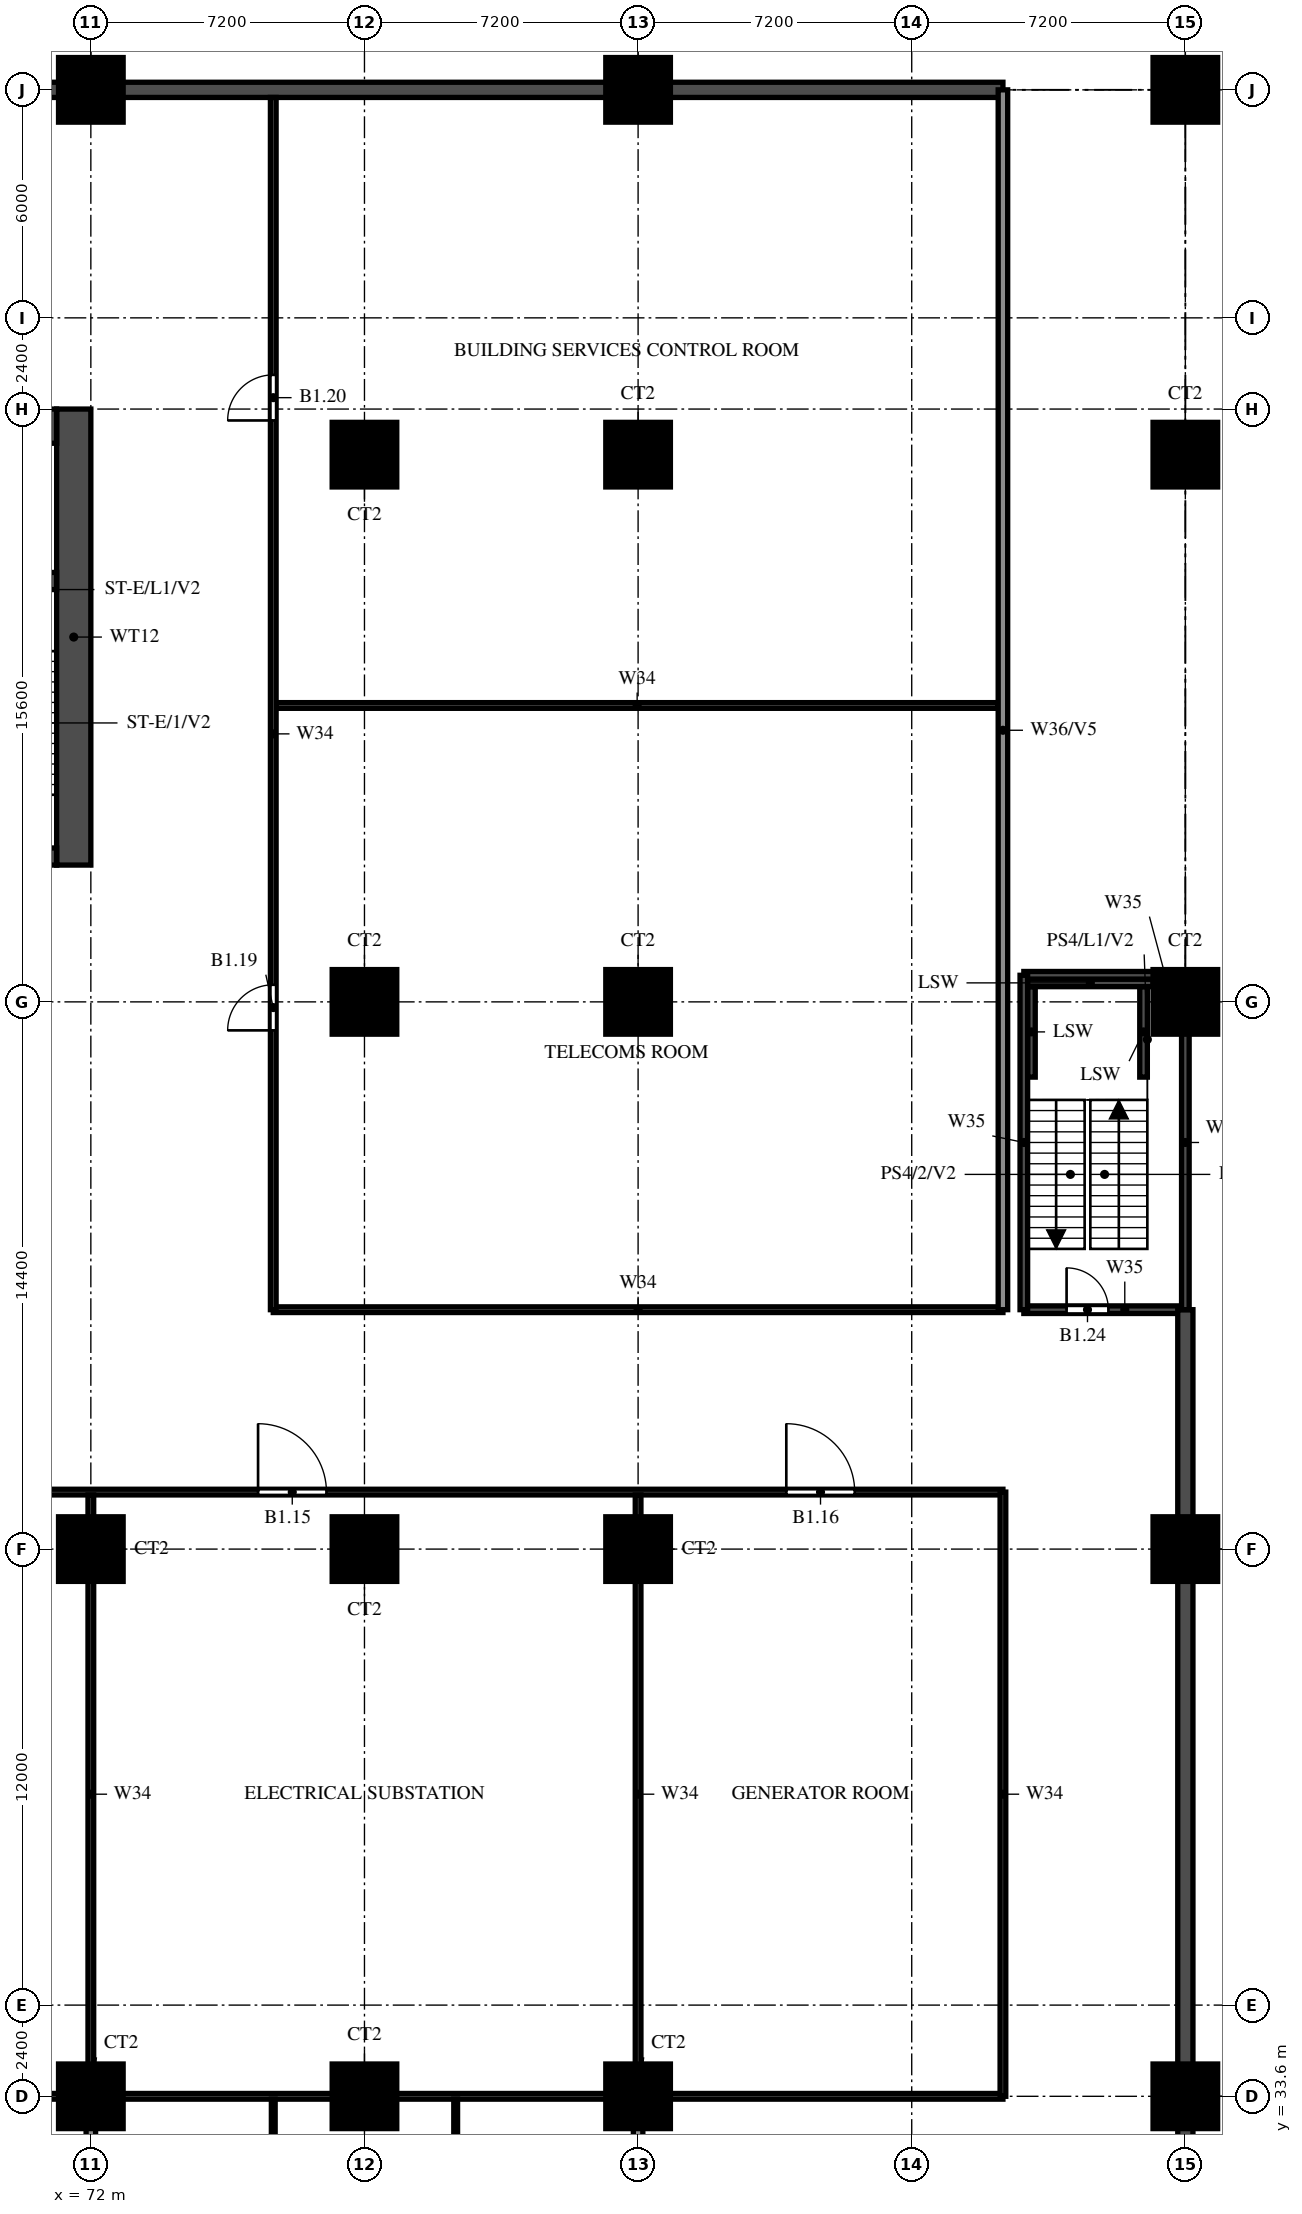
"""IFC4 building model, lengths in metres.
Left out: names, types, materials, properties, quantities, classifications, styles, units other than length and angle.
Written with IfcOpenShell. Run it as: python <this file> out.ifc"""

import sys

from ifc_helpers import new_model, si_unit, direction, frame, frame_2d, origin, origin_2d, place, context, subcontext, project, spatial, rectangle, extrude, source, transform, mapped, element, fill, save


model = new_model("IFC4")
c1 = context("Model", 3, precision=1e-05, world=origin(), true_north=direction((0.0, 1.0)))
c2 = subcontext(c1, "Body", "Model", "MODEL_VIEW")
j1 = project(units=[si_unit("LENGTHUNIT", "METRE"), si_unit("PLANEANGLEUNIT", "RADIAN")], contexts=[c1])
p1 = place(None, origin())
s1 = spatial("IfcSite", under=j1, at=p1, CompositionType="ELEMENT")
p2 = place(p1, origin())
s2 = spatial("IfcBuilding", under=s1, at=p2, CompositionType="ELEMENT")
p3 = place(p2, frame((0.0, 0.0, -5.4)))
s3 = spatial("IfcBuildingStorey", under=s2, at=p3, CompositionType="ELEMENT", Elevation=-5.4)
m1 = source(origin(), c2, "Body", "SweptSolid", [
    extrude(rectangle(XDim=1.7, YDim=1.7, at=origin_2d()), origin(), (0.0, 0.0, 1.0), 5.0),
])
for number, where, z_axis, x_axis in (
    (1, (72.0, 33.6, 0.0), (0.0, 0.0, 1.0), (1.0, 0.0, 0.0)),
    (2, (79.2, 33.6, 0.0), (0.0, 0.0, 1.0), (1.0, 0.0, 0.0)),
    (3, (86.4, 33.6, 0.0), (0.0, 0.0, 1.0), (1.0, 0.0, 0.0)),
    (4, (100.8, 33.6, 0.0), (0.0, 0.0, 1.0), (1.0, 0.0, 0.0)),
    (5, (72.0, 48.0, 0.0), (0.0, 0.0, 1.0), (1.0, 0.0, 0.0)),
    (6, (79.2, 48.0, 0.0), (0.0, 0.0, 1.0), (1.0, 0.0, 0.0)),
    (7, (86.4, 48.0, 0.0), (0.0, 0.0, 1.0), (1.0, 0.0, 0.0)),
    (8, (100.8, 48.0, 0.0), (0.0, 0.0, 1.0), (1.0, 0.0, 0.0)),
    (9, (79.2, 62.4, 0.0), (0.0, 0.0, 1.0), (1.0, 0.0, 0.0)),
    (10, (86.4, 62.4, 0.0), (0.0, 0.0, 1.0), (1.0, 0.0, 0.0)),
    (11, (100.8, 62.4, 0.0), (0.0, 0.0, 1.0), (1.0, 0.0, 0.0)),
    (12, (79.2, 76.8, 0.0), (0.0, 0.0, 1.0), (1.0, 0.0, 0.0)),
    (13, (86.4, 76.8, 0.0), (0.0, 0.0, 1.0), (1.0, 0.0, 0.0)),
    (14, (100.8, 76.8, 0.0), (0.0, 0.0, 1.0), (1.0, 0.0, 0.0)),
    (15, (72.0, 86.4, 0.0), (0.0, 0.0, 1.0), (1.0, 0.0, 0.0)),
    (16, (86.4, 86.4, 0.0), (0.0, 0.0, 1.0), (1.0, 0.0, 0.0)),
    (17, (100.8, 86.4, 0.0), (0.0, 0.0, 1.0), (1.0, 0.0, 0.0)),
):
    element("IfcColumn", number, at=place(p3, frame(where, z_axis=z_axis, x_axis=x_axis)), inside=s3, PredefinedType="COLUMN", context=c2, shape_type="MappedRepresentation", body=[
        mapped(m1, transform((0.0, 0.0, 0.0))),
    ])
p4 = place(p3, frame((71.55, 66.0, 0.0), z_axis=(0.0, 0.0, 1.0), x_axis=(0.0, 1.0, 0.0)))
e18 = element("IfcWall", 18, at=p4, inside=s3, PredefinedType="SHEAR", context=c2, shape_type="SweptSolid", body=[
    extrude(rectangle(XDim=12.0, YDim=0.9, at=frame_2d((6.0, 0.0))), origin(), (0.0, 0.0, 1.0), 5.0),
])
p5 = place(p3, frame((29.7, 77.55, 0.0), z_axis=(0.0, 0.0, 1.0), x_axis=(1.0, 0.0, 0.0)))
e19 = element("IfcWall", 19, at=p5, inside=s3, PredefinedType="SHEAR", context=c2, shape_type="SweptSolid", body=[
    extrude(rectangle(XDim=41.4, YDim=0.9, at=frame_2d((20.7, 0.0))), origin(), (0.0, 0.0, 1.0), 5.0),
])
p6 = place(p3, frame((29.7, 66.225, 0.0), z_axis=(0.0, 0.0, 1.0), x_axis=(1.0, 0.0, 0.0)))
e20 = element("IfcWall", 20, at=p6, inside=s3, PredefinedType="SHEAR", context=c2, shape_type="SweptSolid", body=[
    extrude(rectangle(XDim=41.4, YDim=0.45, at=frame_2d((20.7, 0.0))), origin(), (0.0, 0.0, 1.0), 5.0),
])
p7 = place(p6, frame((0.925, 0.0, 0.0)))
e21 = element("IfcOpeningElement", 21, at=p7, cuts=e20, PredefinedType="OPENING", context=c2, shape_type="SweptSolid", body=[
    extrude(rectangle(XDim=1.1, YDim=2.1, at=frame_2d((0.55, 1.05))), frame((0.0, 0.235, 0.0), z_axis=(0.0, -1.0, 0.0), x_axis=(1.0, 0.0, 0.0)), (0.0, 0.0, 1.0), 0.47),
])
p8 = place(p6, frame((3.738, 0.0, 0.0)))
e22 = element("IfcOpeningElement", 22, at=p8, cuts=e20, PredefinedType="OPENING", context=c2, shape_type="SweptSolid", body=[
    extrude(rectangle(XDim=1.8, YDim=2.1, at=frame_2d((0.9, 1.05))), frame((0.0, 0.235, 0.0), z_axis=(0.0, -1.0, 0.0), x_axis=(1.0, 0.0, 0.0)), (0.0, 0.0, 1.0), 0.47),
])
p9 = place(p3, frame((67.925, 73.475, 0.0), z_axis=(0.0, 0.0, 1.0), x_axis=(1.0, 0.0, 0.0)))
e23 = element("IfcWall", 23, at=p9, inside=s3, PredefinedType="SHEAR", context=c2, shape_type="SweptSolid", body=[
    extrude(rectangle(XDim=3.175, YDim=0.45, at=frame_2d((1.587, 0.0))), origin(), (0.0, 0.0, 1.0), 5.0),
])
for number, where, z_axis, x_axis in (
    (24, (96.75, 60.42, 0.0), (0.0, 0.0, 1.0), (0.0, 1.0, 0.0)),
    (25, (99.7, 60.42, 0.0), (0.0, 0.0, 1.0), (0.0, 1.0, 0.0)),
):
    element("IfcWall", number, at=place(p3, frame(where, z_axis=z_axis, x_axis=x_axis)), inside=s3, PredefinedType="SOLIDWALL", context=c2, shape_type="SweptSolid", body=[
        extrude(rectangle(XDim=2.38, YDim=0.2, at=frame_2d((1.19, 0.0))), origin(), (0.0, 0.0, 1.0), 2.5),
    ])
p10 = place(p3, frame((96.65, 62.9, 0.0), z_axis=(0.0, 0.0, 1.0), x_axis=(1.0, 0.0, 0.0)))
e26 = element("IfcWall", 26, at=p10, inside=s3, PredefinedType="SOLIDWALL", context=c2, shape_type="SweptSolid", body=[
    extrude(rectangle(XDim=3.3, YDim=0.2, at=frame_2d((1.65, 0.0))), origin(), (0.0, 0.0, 1.0), 2.5),
])
p11 = place(p3, frame((4.8, 33.6, 0.0), z_axis=(0.0, 0.0, 1.0), x_axis=(1.0, 0.0, 0.0)))
e27 = element("IfcWall", 27, at=p11, inside=s3, PredefinedType="PARTITIONING", context=c2, shape_type="SweptSolid", body=[
    extrude(rectangle(XDim=91.2, YDim=0.15, at=frame_2d((45.6, 0.0))), origin(), (0.0, 0.0, 1.0), 3.8),
])
p12 = place(p3, frame((4.8, 49.5, 0.0), z_axis=(0.0, 0.0, 1.0), x_axis=(1.0, 0.0, 0.0)))
e28 = element("IfcWall", 28, at=p12, inside=s3, PredefinedType="PARTITIONING", context=c2, shape_type="SweptSolid", body=[
    extrude(rectangle(XDim=91.2, YDim=0.15, at=frame_2d((45.6, 0.0))), origin(), (0.0, 0.0, 1.0), 3.8),
])
p13 = place(p12, frame((6.8, 0.0, 0.0)))
e29 = element("IfcOpeningElement", 29, at=p13, cuts=e28, PredefinedType="OPENING", context=c2, shape_type="SweptSolid", body=[
    extrude(rectangle(XDim=1.8, YDim=2.4, at=frame_2d((0.9, 1.2))), frame((0.0, 0.085, 0.0), z_axis=(0.0, -1.0, 0.0), x_axis=(1.0, 0.0, 0.0)), (0.0, 0.0, 1.0), 0.17),
])
p14 = place(p12, frame((27.9, 0.0, 0.0)))
e30 = element("IfcOpeningElement", 30, at=p14, cuts=e28, PredefinedType="OPENING", context=c2, shape_type="SweptSolid", body=[
    extrude(rectangle(XDim=1.8, YDim=2.4, at=frame_2d((0.9, 1.2))), frame((0.0, 0.085, 0.0), z_axis=(0.0, -1.0, 0.0), x_axis=(1.0, 0.0, 0.0)), (0.0, 0.0, 1.0), 0.17),
])
p15 = place(p12, frame((42.8, 0.0, 0.0)))
e31 = element("IfcOpeningElement", 31, at=p15, cuts=e28, PredefinedType="OPENING", context=c2, shape_type="SweptSolid", body=[
    extrude(rectangle(XDim=1.8, YDim=2.4, at=frame_2d((0.9, 1.2))), frame((0.0, 0.085, 0.0), z_axis=(0.0, -1.0, 0.0), x_axis=(1.0, 0.0, 0.0)), (0.0, 0.0, 1.0), 0.17),
])
p16 = place(p12, frame((57.2, 0.0, 0.0)))
e32 = element("IfcOpeningElement", 32, at=p16, cuts=e28, PredefinedType="OPENING", context=c2, shape_type="SweptSolid", body=[
    extrude(rectangle(XDim=1.8, YDim=2.4, at=frame_2d((0.9, 1.2))), frame((0.0, 0.085, 0.0), z_axis=(0.0, -1.0, 0.0), x_axis=(1.0, 0.0, 0.0)), (0.0, 0.0, 1.0), 0.17),
])
p17 = place(p12, frame((71.6, 0.0, 0.0)))
e33 = element("IfcOpeningElement", 33, at=p17, cuts=e28, PredefinedType="OPENING", context=c2, shape_type="SweptSolid", body=[
    extrude(rectangle(XDim=1.8, YDim=2.4, at=frame_2d((0.9, 1.2))), frame((0.0, 0.085, 0.0), z_axis=(0.0, -1.0, 0.0), x_axis=(1.0, 0.0, 0.0)), (0.0, 0.0, 1.0), 0.17),
])
p18 = place(p12, frame((85.5, 0.0, 0.0)))
e34 = element("IfcOpeningElement", 34, at=p18, cuts=e28, PredefinedType="OPENING", context=c2, shape_type="SweptSolid", body=[
    extrude(rectangle(XDim=1.8, YDim=2.4, at=frame_2d((0.9, 1.2))), frame((0.0, 0.085, 0.0), z_axis=(0.0, -1.0, 0.0), x_axis=(1.0, 0.0, 0.0)), (0.0, 0.0, 1.0), 0.17),
])
p19 = place(p3, frame((76.8, 54.3, 0.0), z_axis=(0.0, 0.0, 1.0), x_axis=(1.0, 0.0, 0.0)))
e35 = element("IfcWall", 35, at=p19, inside=s3, PredefinedType="PARTITIONING", context=c2, shape_type="SweptSolid", body=[
    extrude(rectangle(XDim=19.2, YDim=0.15, at=frame_2d((9.6, 0.0))), origin(), (0.0, 0.0, 1.0), 3.8),
])
p20 = place(p3, frame((96.55, 54.3, 0.0), z_axis=(0.0, 0.0, 1.0), x_axis=(1.0, 0.0, 0.0)))
e36 = element("IfcWall", 36, at=p20, inside=s3, PredefinedType="SOLIDWALL", context=c2, shape_type="SweptSolid", body=[
    extrude(rectangle(XDim=4.25, YDim=0.2, at=frame_2d((2.125, 0.0))), origin(), (0.0, 0.0, 1.0), 5.0),
])
p21 = place(p20, frame((1.125, 0.0, 0.0)))
e37 = element("IfcOpeningElement", 37, at=p21, cuts=e36, PredefinedType="OPENING", context=c2, shape_type="SweptSolid", body=[
    extrude(rectangle(XDim=1.1, YDim=2.1, at=frame_2d((0.55, 1.05))), frame((0.0, 0.11, 0.0), z_axis=(0.0, -1.0, 0.0), x_axis=(1.0, 0.0, 0.0)), (0.0, 0.0, 1.0), 0.22),
])
p22 = place(p3, frame((96.55, 63.1, 0.0), z_axis=(0.0, 0.0, 1.0), x_axis=(1.0, 0.0, 0.0)))
e38 = element("IfcWall", 38, at=p22, inside=s3, PredefinedType="SOLIDWALL", context=c2, shape_type="SweptSolid", body=[
    extrude(rectangle(XDim=4.25, YDim=0.2, at=frame_2d((2.125, 0.0))), origin(), (0.0, 0.0, 1.0), 5.0),
])
p23 = place(p3, frame((76.875, 70.2, 0.0), z_axis=(0.0, 0.0, 1.0), x_axis=(1.0, 0.0, 0.0)))
e39 = element("IfcWall", 39, at=p23, inside=s3, PredefinedType="PARTITIONING", context=c2, shape_type="SweptSolid", body=[
    extrude(rectangle(XDim=19.0, YDim=0.15, at=frame_2d((9.5, 0.0))), origin(), (0.0, 0.0, 1.0), 3.8),
])
p24 = place(p3, frame((4.8, 86.4, 0.0), z_axis=(0.0, 0.0, 1.0), x_axis=(1.0, 0.0, 0.0)))
e40 = element("IfcWall", 40, at=p24, inside=s3, PredefinedType="SOLIDWALL", context=c2, shape_type="SweptSolid", body=[
    extrude(rectangle(XDim=91.2, YDim=0.4, at=frame_2d((45.6, 0.0))), origin(), (0.0, 0.0, 1.0), 5.0),
])
p25 = place(p3, frame((72.0, 33.675, 0.0), z_axis=(0.0, 0.0, 1.0), x_axis=(0.0, 1.0, 0.0)))
e41 = element("IfcWall", 41, at=p25, inside=s3, PredefinedType="PARTITIONING", context=c2, shape_type="SweptSolid", body=[
    extrude(rectangle(XDim=15.75, YDim=0.15, at=frame_2d((7.875, 0.0))), origin(), (0.0, 0.0, 1.0), 3.8),
])
p26 = place(p3, frame((72.0, 24.0, 0.0), z_axis=(0.0, 0.0, 1.0), x_axis=(0.0, 1.0, 0.0)))
e42 = element("IfcWall", 42, at=p26, inside=s3, PredefinedType="SOLIDWALL", context=c2, shape_type="SweptSolid", body=[
    extrude(rectangle(XDim=9.525, YDim=0.25, at=frame_2d((4.762, 0.0))), origin(), (0.0, 0.0, 1.0), 3.8),
])
p27 = place(p3, frame((76.8, 24.125, 0.0), z_axis=(0.0, 0.0, 1.0), x_axis=(0.0, 1.0, 0.0)))
e43 = element("IfcWall", 43, at=p27, inside=s3, PredefinedType="PARTITIONING", context=c2, shape_type="SweptSolid", body=[
    extrude(rectangle(XDim=9.4, YDim=0.1, at=frame_2d((4.7, 0.0))), origin(), (0.0, 0.0, 1.0), 5.0),
])
p28 = place(p27, frame((2.675, 0.0, 0.0)))
e44 = element("IfcOpeningElement", 44, at=p28, cuts=e43, PredefinedType="OPENING", context=c2, shape_type="SweptSolid", body=[
    extrude(rectangle(XDim=1.0, YDim=2.1, at=frame_2d((0.5, 1.05))), frame((0.0, 0.06, 0.0), z_axis=(0.0, -1.0, 0.0), x_axis=(1.0, 0.0, 0.0)), (0.0, 0.0, 1.0), 0.12),
])
p29 = place(p27, frame((7.475, 0.0, 0.0)))
e45 = element("IfcOpeningElement", 45, at=p29, cuts=e43, PredefinedType="OPENING", context=c2, shape_type="SweptSolid", body=[
    extrude(rectangle(XDim=1.0, YDim=2.1, at=frame_2d((0.5, 1.05))), frame((0.0, 0.06, 0.0), z_axis=(0.0, -1.0, 0.0), x_axis=(1.0, 0.0, 0.0)), (0.0, 0.0, 1.0), 0.12),
])
p30 = place(p3, frame((76.8, 54.3, 0.0), z_axis=(0.0, 0.0, 1.0), x_axis=(0.0, 1.0, 0.0)))
e46 = element("IfcWall", 46, at=p30, inside=s3, PredefinedType="PARTITIONING", context=c2, shape_type="SweptSolid", body=[
    extrude(rectangle(XDim=31.9, YDim=0.15, at=frame_2d((15.95, 0.0))), origin(), (0.0, 0.0, 1.0), 3.8),
])
p31 = place(p30, frame((7.35, 0.0, 0.0)))
e47 = element("IfcOpeningElement", 47, at=p31, cuts=e46, PredefinedType="OPENING", context=c2, shape_type="SweptSolid", body=[
    extrude(rectangle(XDim=1.2, YDim=2.1, at=frame_2d((0.6, 1.05))), frame((0.0, 0.085, 0.0), z_axis=(0.0, -1.0, 0.0), x_axis=(1.0, 0.0, 0.0)), (0.0, 0.0, 1.0), 0.17),
])
p32 = place(p30, frame((23.4, 0.0, 0.0)))
e48 = element("IfcOpeningElement", 48, at=p32, cuts=e46, PredefinedType="OPENING", context=c2, shape_type="SweptSolid", body=[
    extrude(rectangle(XDim=1.2, YDim=2.1, at=frame_2d((0.6, 1.05))), frame((0.0, 0.085, 0.0), z_axis=(0.0, -1.0, 0.0), x_axis=(1.0, 0.0, 0.0)), (0.0, 0.0, 1.0), 0.17),
])
p33 = place(p3, frame((81.6, 24.125, 0.0), z_axis=(0.0, 0.0, 1.0), x_axis=(0.0, 1.0, 0.0)))
e49 = element("IfcWall", 49, at=p33, inside=s3, PredefinedType="PARTITIONING", context=c2, shape_type="SweptSolid", body=[
    extrude(rectangle(XDim=9.4, YDim=0.1, at=frame_2d((4.7, 0.0))), origin(), (0.0, 0.0, 1.0), 5.0),
])
p34 = place(p33, frame((4.175, 0.0, 0.0)))
e50 = element("IfcOpeningElement", 50, at=p34, cuts=e49, PredefinedType="OPENING", context=c2, shape_type="SweptSolid", body=[
    extrude(rectangle(XDim=1.0, YDim=2.1, at=frame_2d((0.5, 1.05))), frame((0.0, 0.06, 0.0), z_axis=(0.0, -1.0, 0.0), x_axis=(1.0, 0.0, 0.0)), (0.0, 0.0, 1.0), 0.12),
])
p35 = place(p3, frame((86.4, 33.675, 0.0), z_axis=(0.0, 0.0, 1.0), x_axis=(0.0, 1.0, 0.0)))
e51 = element("IfcWall", 51, at=p35, inside=s3, PredefinedType="PARTITIONING", context=c2, shape_type="SweptSolid", body=[
    extrude(rectangle(XDim=15.75, YDim=0.15, at=frame_2d((7.875, 0.0))), origin(), (0.0, 0.0, 1.0), 3.8),
])
p36 = place(p3, frame((86.4, 24.0, 0.0), z_axis=(0.0, 0.0, 1.0), x_axis=(0.0, 1.0, 0.0)))
e52 = element("IfcWall", 52, at=p36, inside=s3, PredefinedType="SOLIDWALL", context=c2, shape_type="SweptSolid", body=[
    extrude(rectangle(XDim=9.525, YDim=0.25, at=frame_2d((4.762, 0.0))), origin(), (0.0, 0.0, 1.0), 3.8),
])
p37 = place(p3, frame((96.0, 33.6, 0.0), z_axis=(0.0, 0.0, 1.0), x_axis=(0.0, 1.0, 0.0)))
e53 = element("IfcWall", 53, at=p37, inside=s3, PredefinedType="PARTITIONING", context=c2, shape_type="SweptSolid", body=[
    extrude(rectangle(XDim=15.9, YDim=0.15, at=frame_2d((7.95, 0.0))), origin(), (0.0, 0.0, 1.0), 3.8),
])
p38 = place(p3, frame((96.0, 54.3, 0.0), z_axis=(0.0, 0.0, 1.0), x_axis=(0.0, 1.0, 0.0)))
e54 = element("IfcWall", 54, at=p38, inside=s3, PredefinedType="SOLIDWALL", context=c2, shape_type="SweptSolid", body=[
    extrude(rectangle(XDim=32.1, YDim=0.25, at=frame_2d((16.05, 0.0))), origin(), (0.0, 0.0, 1.0), 2.2),
])
p39 = place(p3, frame((96.55, 54.3, 0.0), z_axis=(0.0, 0.0, 1.0), x_axis=(0.0, 1.0, 0.0)))
e55 = element("IfcWall", 55, at=p39, inside=s3, PredefinedType="SOLIDWALL", context=c2, shape_type="SweptSolid", body=[
    extrude(rectangle(XDim=8.8, YDim=0.2, at=frame_2d((4.4, 0.0))), origin(), (0.0, 0.0, 1.0), 5.0),
])
p40 = place(p3, frame((100.8, 7.7, 0.0), z_axis=(0.0, 0.0, 1.0), x_axis=(0.0, 1.0, 0.0)))
e56 = element("IfcWall", 56, at=p40, inside=s3, PredefinedType="SOLIDWALL", context=c2, shape_type="SweptSolid", body=[
    extrude(rectangle(XDim=46.6, YDim=0.4, at=frame_2d((23.3, 0.0))), origin(), (0.0, 0.0, 1.0), 5.0),
])
p41 = place(p3, frame((100.8, 54.3, 0.0), z_axis=(0.0, 0.0, 1.0), x_axis=(0.0, 1.0, 0.0)))
e57 = element("IfcWall", 57, at=p41, inside=s3, PredefinedType="SOLIDWALL", context=c2, shape_type="SweptSolid", body=[
    extrude(rectangle(XDim=8.8, YDim=0.2, at=frame_2d((4.4, 0.0))), origin(), (0.0, 0.0, 1.0), 5.0),
])
p42 = place(p17, origin())
e58 = element("IfcDoor", 58, at=p42, inside=s3, OperationType="DOUBLE_DOOR_SINGLE_SWING", PredefinedType="DOOR", context=c2, shape_type="SweptSolid", body=[
    extrude(rectangle(XDim=1.8, YDim=2.4, at=frame_2d((0.9, 1.2))), frame((0.0, 0.025, 0.0), z_axis=(0.0, -1.0, 0.0), x_axis=(1.0, 0.0, 0.0)), (0.0, 0.0, 1.0), 0.05),
])
fill(e33, e58)
p43 = place(p18, origin())
e59 = element("IfcDoor", 59, at=p43, inside=s3, OperationType="DOUBLE_DOOR_SINGLE_SWING", PredefinedType="DOOR", context=c2, shape_type="SweptSolid", body=[
    extrude(rectangle(XDim=1.8, YDim=2.4, at=frame_2d((0.9, 1.2))), frame((0.0, 0.025, 0.0), z_axis=(0.0, -1.0, 0.0), x_axis=(1.0, 0.0, 0.0)), (0.0, 0.0, 1.0), 0.05),
])
fill(e34, e59)
p44 = place(p31, origin())
e60 = element("IfcDoor", 60, at=p44, inside=s3, OperationType="SINGLE_SWING_LEFT", PredefinedType="DOOR", context=c2, shape_type="SweptSolid", body=[
    extrude(rectangle(XDim=1.2, YDim=2.1, at=frame_2d((0.6, 1.05))), frame((0.0, 0.025, 0.0), z_axis=(0.0, -1.0, 0.0), x_axis=(1.0, 0.0, 0.0)), (0.0, 0.0, 1.0), 0.05),
])
fill(e47, e60)
p45 = place(p32, origin())
e61 = element("IfcDoor", 61, at=p45, inside=s3, OperationType="SINGLE_SWING_RIGHT", PredefinedType="DOOR", context=c2, shape_type="SweptSolid", body=[
    extrude(rectangle(XDim=1.2, YDim=2.1, at=frame_2d((0.6, 1.05))), frame((0.0, 0.025, 0.0), z_axis=(0.0, -1.0, 0.0), x_axis=(1.0, 0.0, 0.0)), (0.0, 0.0, 1.0), 0.05),
])
fill(e48, e61)
p46 = place(p21, origin())
e62 = element("IfcDoor", 62, at=p46, inside=s3, OperationType="SINGLE_SWING_LEFT", PredefinedType="DOOR", context=c2, shape_type="SweptSolid", body=[
    extrude(rectangle(XDim=1.1, YDim=2.1, at=frame_2d((0.55, 1.05))), frame((0.0, 0.025, 0.0), z_axis=(0.0, -1.0, 0.0), x_axis=(1.0, 0.0, 0.0)), (0.0, 0.0, 1.0), 0.05),
])
fill(e37, e62)
save(model, sys.argv[1])
